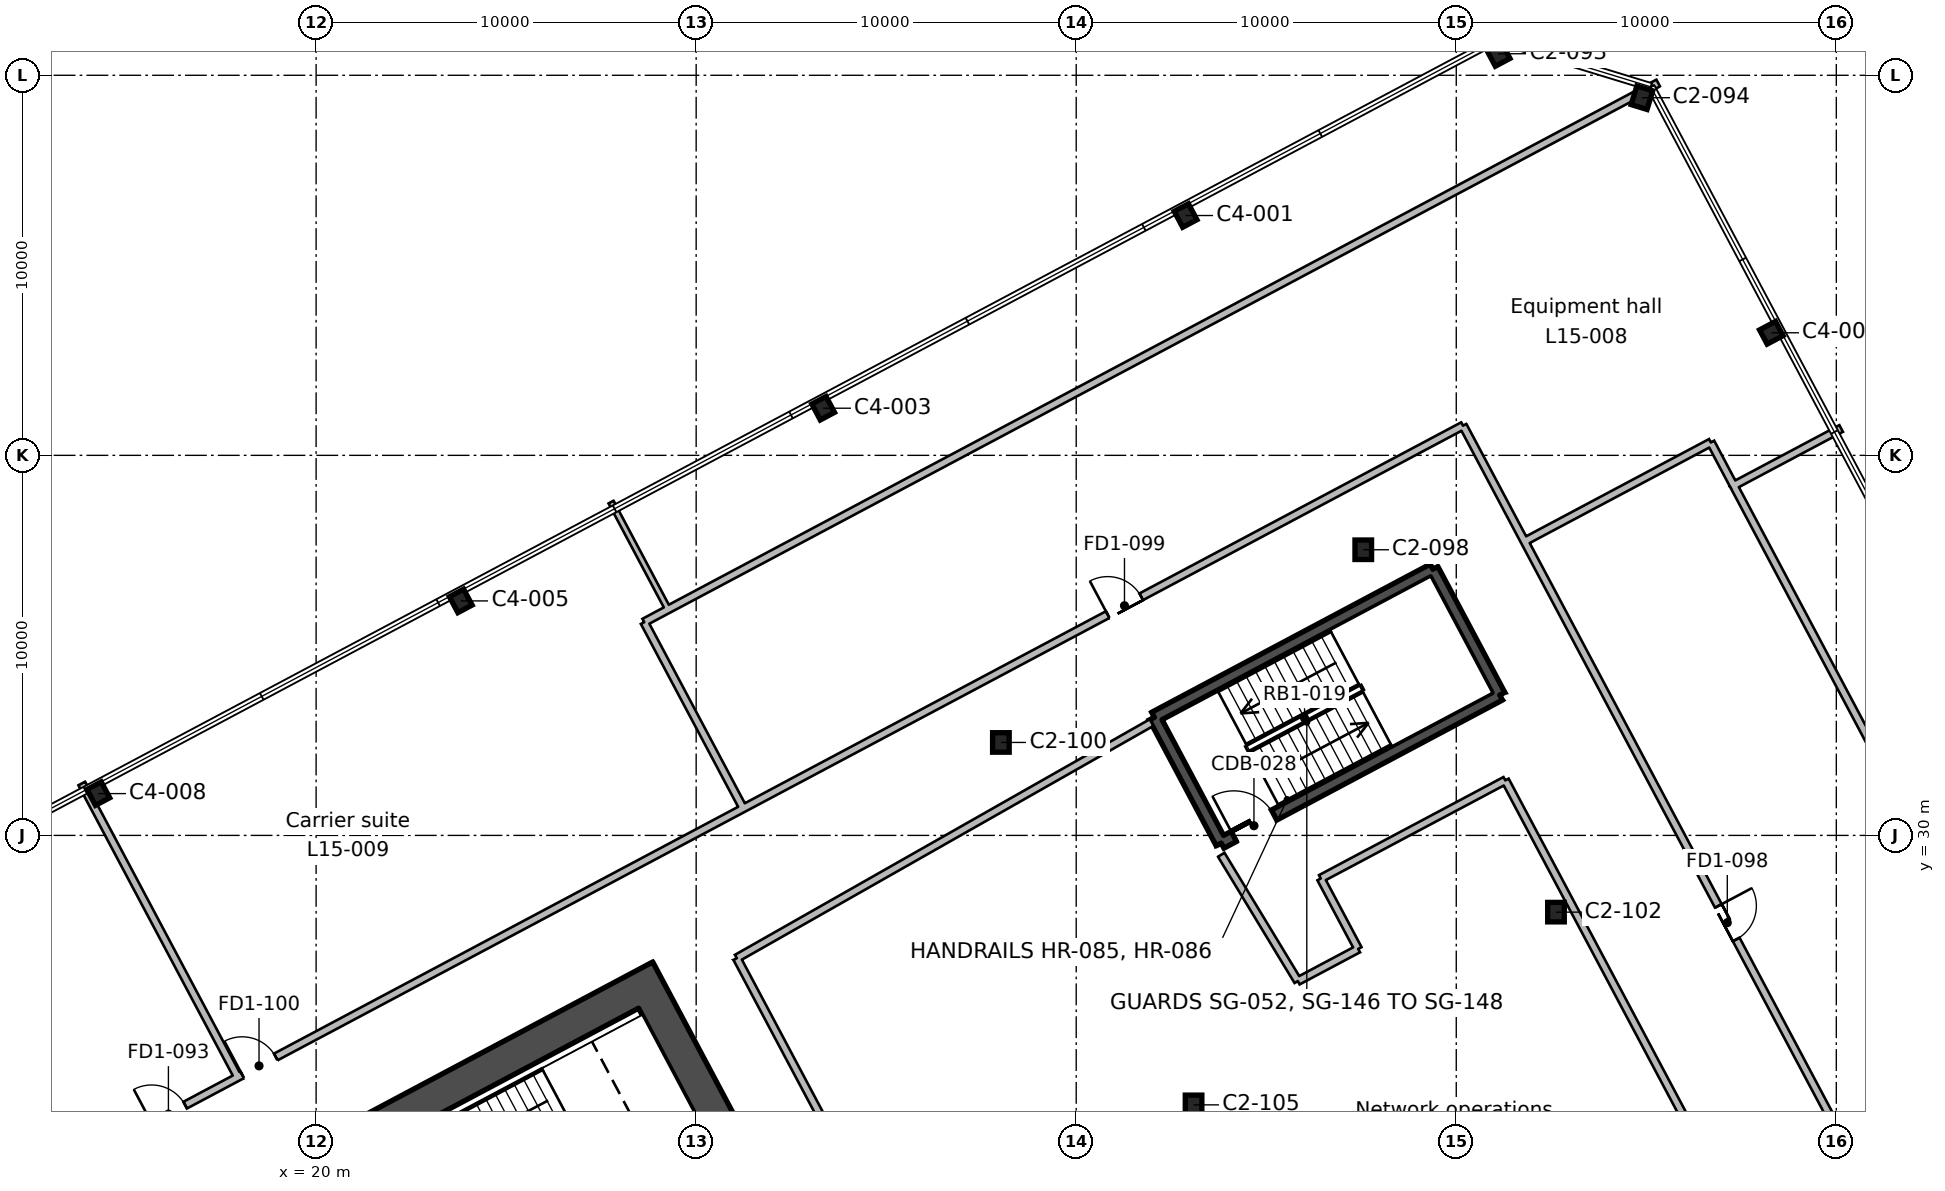
"""IFC4 building model, lengths in metres.
Left out: names, types, materials, properties, quantities, classifications, styles, units other than length and angle.
Written with IfcOpenShell. Run it as: python <this file> out.ifc"""

import sys

from ifc_helpers import new_model, si_unit, direction, frame, frame_2d, origin, origin_2d, place, context, subcontext, project, spatial, rectangle, i_section, extrude, element, fill, save


model = new_model("IFC4")
c1 = context("Model", 3, precision=1e-05, world=origin(), true_north=direction((0.0, 1.0)))
c2 = subcontext(c1, "Body", "Model", "MODEL_VIEW")
j1 = project(units=[si_unit("LENGTHUNIT", "METRE"), si_unit("PLANEANGLEUNIT", "RADIAN")], contexts=[c1])
p1 = place(None, origin())
s1 = spatial("IfcSite", under=j1, at=p1, CompositionType="ELEMENT")
p2 = place(p1, origin())
s2 = spatial("IfcBuilding", under=s1, at=p2, CompositionType="ELEMENT")
p3 = place(p2, frame((0.0, 0.0, 80.0)))
s3 = spatial("IfcBuildingStorey", under=s2, at=p3, CompositionType="ELEMENT", Elevation=80.0)
for number, where, z_axis, x_axis in (
    (1, (43.088, 22.91, 0.0), (0.0, 0.0, 1.0), (1.0, 0.0, 0.0)),
    (2, (52.624, 27.981, 0.0), (0.0, 0.0, 1.0), (1.0, 0.0, 0.0)),
):
    element("IfcColumn", number, at=place(p3, frame(where, z_axis=z_axis, x_axis=x_axis)), inside=s3, PredefinedType="COLUMN", context=c2, shape_type="SweptSolid", body=[
        extrude(i_section(OverallWidth=0.437, OverallDepth=0.513, WebThickness=0.061, FlangeThickness=0.097, FilletRadius=0.015, at=origin_2d()), origin(), (0.0, 0.0, 1.0), 4.6),
    ])
p4 = place(p3, frame((14.27, 31.1, 0.0), z_axis=(0.0, 0.0, 1.0), x_axis=(-0.882947592859, -0.469471562786, 0.0)))
e3 = element("IfcColumn", 3, at=p4, inside=s3, PredefinedType="COLUMN", context=c2, shape_type="SweptSolid", body=[
    extrude(i_section(OverallWidth=0.424, OverallDepth=0.475, WebThickness=0.048, FlangeThickness=0.077, FilletRadius=0.015, at=origin_2d()), origin(), (0.0, 0.0, 1.0), 4.6),
])
p5 = place(p3, frame((38.018, 32.446, 0.0), z_axis=(0.0, 0.0, 1.0), x_axis=(1.0, 0.0, 0.0)))
e4 = element("IfcColumn", 4, at=p5, inside=s3, PredefinedType="COLUMN", context=c2, shape_type="SweptSolid", body=[
    extrude(i_section(OverallWidth=0.437, OverallDepth=0.513, WebThickness=0.061, FlangeThickness=0.097, FilletRadius=0.015, at=origin_2d()), origin(), (0.0, 0.0, 1.0), 4.6),
])
p6 = place(p3, frame((23.806, 36.17, 0.0), z_axis=(0.0, 0.0, 1.0), x_axis=(-0.882947592859, -0.469471562786, 0.0)))
e5 = element("IfcColumn", 5, at=p6, inside=s3, PredefinedType="COLUMN", context=c2, shape_type="SweptSolid", body=[
    extrude(i_section(OverallWidth=0.424, OverallDepth=0.475, WebThickness=0.048, FlangeThickness=0.077, FilletRadius=0.015, at=origin_2d()), origin(), (0.0, 0.0, 1.0), 4.6),
])
p7 = place(p3, frame((47.553, 37.516, 0.0), z_axis=(0.0, 0.0, 1.0), x_axis=(1.0, 0.0, 0.0)))
e6 = element("IfcColumn", 6, at=p7, inside=s3, PredefinedType="COLUMN", context=c2, shape_type="SweptSolid", body=[
    extrude(i_section(OverallWidth=0.437, OverallDepth=0.513, WebThickness=0.061, FlangeThickness=0.097, FilletRadius=0.015, at=origin_2d()), origin(), (0.0, 0.0, 1.0), 4.6),
])
for number, where, z_axis, x_axis in (
    (7, (33.342, 41.24, 0.0), (0.0, 0.0, 1.0), (-0.883, -0.469, 0.0)),
    (8, (58.29, 43.225, 0.0), (0.0, 0.0, 1.0), (-0.469, 0.883, 0.0)),
    (9, (42.877, 46.31, 0.0), (0.0, 0.0, 1.0), (-0.883, -0.469, 0.0)),
):
    element("IfcColumn", number, at=place(p3, frame(where, z_axis=z_axis, x_axis=x_axis)), inside=s3, PredefinedType="COLUMN", context=c2, shape_type="SweptSolid", body=[
        extrude(i_section(OverallWidth=0.424, OverallDepth=0.475, WebThickness=0.048, FlangeThickness=0.077, FilletRadius=0.015, at=origin_2d()), origin(), (0.0, 0.0, 1.0), 4.6),
    ])
for number, where, z_axis, x_axis in (
    (10, (54.886, 49.41, 0.0), (0.0, 0.0, 1.0), (-0.956, 0.292, 0.0)),
    (11, (51.1, 50.567, 0.0), (0.0, 0.0, 1.0), (-0.883, -0.469, 0.0)),
):
    element("IfcColumn", number, at=place(p3, frame(where, z_axis=z_axis, x_axis=x_axis)), inside=s3, PredefinedType="COLUMN", context=c2, shape_type="SweptSolid", body=[
        extrude(i_section(OverallWidth=0.437, OverallDepth=0.513, WebThickness=0.061, FlangeThickness=0.097, FilletRadius=0.015, at=origin_2d()), origin(), (0.0, 0.0, 1.0), 4.6),
    ])
p8 = place(p3, frame((37.849, 8.799, 0.0), z_axis=(0.0, 0.0, 1.0), x_axis=(-0.469465789982, 0.882950662289, 0.0)))
e12 = element("IfcWall", 12, at=p8, inside=s3, PredefinedType="SHEAR", context=c2, shape_type="SweptSolid", body=[
    extrude(rectangle(XDim=20.0, YDim=0.9, at=frame_2d((10.0, 0.0))), origin(), (0.0, 0.0, 1.0), 4.6),
])
p9 = place(p8, frame((10.6, 0.0, 0.0)))
e13 = element("IfcOpeningElement", 13, at=p9, cuts=e12, PredefinedType="OPENING", context=c2, shape_type="SweptSolid", body=[
    extrude(rectangle(XDim=2.4, YDim=2.4, at=frame_2d((1.2, 1.2))), frame((0.0, 0.46, 0.0), z_axis=(0.0, -1.0, 0.0), x_axis=(1.0, 0.0, 0.0)), (0.0, 0.0, 1.0), 0.92),
])
p10 = place(p3, frame((10.438, 16.366, 0.0), z_axis=(0.0, 0.0, 1.0), x_axis=(0.88294509198, 0.469476266226, 0.0)))
e14 = element("IfcWall", 14, at=p10, inside=s3, PredefinedType="SHEAR", context=c2, shape_type="SweptSolid", body=[
    extrude(rectangle(XDim=20.2, YDim=0.9, at=frame_2d((10.1, 0.0))), origin(), (0.0, 0.0, 1.0), 4.6),
])
p11 = place(p3, frame((49.384, 37.004, 0.0), z_axis=(0.0, 0.0, 1.0), x_axis=(0.46946936446, -0.882948761726, 0.0)))
e15 = element("IfcWall", 15, at=p11, inside=s3, PredefinedType="SHEAR", context=c2, shape_type="SweptSolid", body=[
    extrude(rectangle(XDim=3.75, YDim=0.3, at=frame_2d((1.875, 0.0))), origin(), (0.0, 0.0, 1.0), 4.6),
])
p12 = place(p3, frame((51.145, 33.693, 0.0), z_axis=(0.0, 0.0, 1.0), x_axis=(-0.882945809314, -0.469474917132, 0.0)))
e16 = element("IfcWall", 16, at=p12, inside=s3, PredefinedType="SHEAR", context=c2, shape_type="SweptSolid", body=[
    extrude(rectangle(XDim=8.3, YDim=0.3, at=frame_2d((4.15, 0.0))), origin(), (0.0, 0.0, 1.0), 4.6),
])
p13 = place(p12, frame((6.725, 0.0, 0.0)))
e17 = element("IfcOpeningElement", 17, at=p13, cuts=e16, PredefinedType="OPENING", context=c2, shape_type="SweptSolid", body=[
    extrude(rectangle(XDim=1.2, YDim=2.1, at=frame_2d((0.6, 1.05))), frame((0.0, 0.16, 0.0), z_axis=(0.0, -1.0, 0.0), x_axis=(1.0, 0.0, 0.0)), (0.0, 0.0, 1.0), 0.32),
])
p14 = place(p3, frame((43.816, 29.796, 0.0), z_axis=(0.0, 0.0, 1.0), x_axis=(-0.46946936446, 0.882948761726, 0.0)))
e18 = element("IfcWall", 18, at=p14, inside=s3, PredefinedType="SHEAR", context=c2, shape_type="SweptSolid", body=[
    extrude(rectangle(XDim=3.75, YDim=0.3, at=frame_2d((1.875, 0.0))), origin(), (0.0, 0.0, 1.0), 4.6),
])
p15 = place(p3, frame((42.055, 33.107, 0.0), z_axis=(0.0, 0.0, 1.0), x_axis=(0.882945809314, 0.469474917132, 0.0)))
e19 = element("IfcWall", 19, at=p15, inside=s3, PredefinedType="SHEAR", context=c2, shape_type="SweptSolid", body=[
    extrude(rectangle(XDim=8.3, YDim=0.3, at=frame_2d((4.15, 0.0))), origin(), (0.0, 0.0, 1.0), 4.6),
])
p16 = place(p3, frame((0.0, 14.1, 0.0), z_axis=(0.0, 0.0, 1.0), x_axis=(0.882942713919, 0.469480738623, 0.0)))
e20 = element("IfcWall", 20, at=p16, inside=s3, PredefinedType="PARTITIONING", context=c2, shape_type="SweptSolid", body=[
    extrude(rectangle(XDim=36.591, YDim=0.2, at=frame_2d((18.296, 0.0))), origin(), (0.0, 0.0, 1.0), 4.2),
])
p17 = place(p16, frame((20.45, 0.0, 0.0)))
e21 = element("IfcOpeningElement", 21, at=p17, cuts=e20, PredefinedType="OPENING", context=c2, shape_type="SweptSolid", body=[
    extrude(rectangle(XDim=1.0, YDim=2.1, at=frame_2d((0.5, 1.05))), frame((0.0, 0.11, 0.0), z_axis=(0.0, -1.0, 0.0), x_axis=(1.0, 0.0, 0.0)), (0.0, 0.0, 1.0), 0.22),
])
p18 = place(p16, frame((17.75, 0.0, 0.0)))
e22 = element("IfcOpeningElement", 22, at=p18, cuts=e20, PredefinedType="OPENING", context=c2, shape_type="SweptSolid", body=[
    extrude(rectangle(XDim=1.0, YDim=2.1, at=frame_2d((0.5, 1.05))), frame((0.0, 0.11, 0.0), z_axis=(0.0, -1.0, 0.0), x_axis=(1.0, 0.0, 0.0)), (0.0, 0.0, 1.0), 0.22),
])
p19 = place(p3, frame((13.834, 31.366, 0.0), z_axis=(0.0, 0.0, 1.0), x_axis=(0.469374180568, -0.882999365014, 0.0)))
e23 = element("IfcWall", 23, at=p19, inside=s3, PredefinedType="PARTITIONING", context=c2, shape_type="SweptSolid", body=[
    extrude(rectangle(XDim=8.75, YDim=0.2, at=frame_2d((4.375, 0.0))), origin(), (0.0, 0.0, 1.0), 4.2),
])
p20 = place(p3, frame((30.235, 32.599, 0.0), z_axis=(0.0, 0.0, 1.0), x_axis=(0.46945013559, -0.882958985568, 0.0)))
e24 = element("IfcWall", 24, at=p20, inside=s3, PredefinedType="PARTITIONING", context=c2, shape_type="SweptSolid", body=[
    extrude(rectangle(XDim=2.138, YDim=0.2, at=frame_2d((1.069, 0.0))), origin(), (0.0, 0.0, 1.0), 4.2),
])
p21 = place(p3, frame((27.76, 38.771, 0.0), z_axis=(0.0, 0.0, 1.0), x_axis=(0.469320691295, -0.883027796121, 0.0)))
e25 = element("IfcWall", 25, at=p21, inside=s3, PredefinedType="PARTITIONING", context=c2, shape_type="SweptSolid", body=[
    extrude(rectangle(XDim=3.2, YDim=0.15, at=frame_2d((1.6, 0.0))), origin(), (0.0, 0.0, 1.0), 4.2),
])
p22 = place(p3, frame((29.26, 35.945, 0.0), z_axis=(0.0, 0.0, 1.0), x_axis=(0.882955510648, 0.469456671288, 0.0)))
e26 = element("IfcWall", 26, at=p22, inside=s3, PredefinedType="PARTITIONING", context=c2, shape_type="SweptSolid", body=[
    extrude(rectangle(XDim=29.507, YDim=0.2, at=frame_2d((14.753, 0.0))), origin(), (0.0, 0.0, 1.0), 4.2),
])
p23 = place(p3, frame((30.235, 32.599, 0.0), z_axis=(0.0, 0.0, 1.0), x_axis=(-0.469599917758, 0.882879333341, 0.0)))
e27 = element("IfcWall", 27, at=p23, inside=s3, PredefinedType="PARTITIONING", context=c2, shape_type="SweptSolid", body=[
    extrude(rectangle(XDim=3.412, YDim=0.2, at=frame_2d((1.706, 0.0))), origin(), (0.0, 0.0, 1.0), 4.2),
])
p24 = place(p3, frame((28.633, 35.611, 0.0), z_axis=(0.0, 0.0, 1.0), x_axis=(0.882581167339, 0.470160061106, 0.0)))
e28 = element("IfcWall", 28, at=p24, inside=s3, PredefinedType="PARTITIONING", context=c2, shape_type="SweptSolid", body=[
    extrude(rectangle(XDim=0.71, YDim=0.2, at=frame_2d((0.355, 0.0))), origin(), (0.0, 0.0, 1.0), 4.2),
])
p25 = place(p3, frame((32.308, 31.279, 0.0), z_axis=(0.0, 0.0, 1.0), x_axis=(0.882939951573, 0.469485933673, 0.0)))
e29 = element("IfcWall", 29, at=p25, inside=s3, PredefinedType="PARTITIONING", context=c2, shape_type="SweptSolid", body=[
    extrude(rectangle(XDim=20.239, YDim=0.2, at=frame_2d((10.12, 0.0))), origin(), (0.0, 0.0, 1.0), 4.2),
])
p26 = place(p25, frame((9.65, 0.0, 0.0)))
e30 = element("IfcOpeningElement", 30, at=p26, cuts=e29, PredefinedType="OPENING", context=c2, shape_type="SweptSolid", body=[
    extrude(rectangle(XDim=1.0, YDim=2.1, at=frame_2d((0.5, 1.05))), frame((0.0, 0.11, 0.0), z_axis=(0.0, -1.0, 0.0), x_axis=(1.0, 0.0, 0.0)), (0.0, 0.0, 1.0), 0.22),
])
p27 = place(p3, frame((50.178, 40.781, 0.0), z_axis=(0.0, 0.0, 1.0), x_axis=(0.469355564401, -0.883009260521, 0.0)))
e31 = element("IfcWall", 31, at=p27, inside=s3, PredefinedType="PARTITIONING", context=c2, shape_type="SweptSolid", body=[
    extrude(rectangle(XDim=3.445, YDim=0.2, at=frame_2d((1.723, 0.0))), origin(), (0.0, 0.0, 1.0), 4.2),
])
p28 = place(p3, frame((39.567, 10.788, 0.0), z_axis=(0.0, 0.0, 1.0), x_axis=(-0.469474056812, 0.882946266757, 0.0)))
e32 = element("IfcWall", 32, at=p28, inside=s3, PredefinedType="PARTITIONING", context=c2, shape_type="SweptSolid", body=[
    extrude(rectangle(XDim=18.101, YDim=0.2, at=frame_2d((9.05, 0.0))), origin(), (0.0, 0.0, 1.0), 4.2),
])
p29 = place(p28, frame((8.55, 0.0, 0.0)))
e33 = element("IfcOpeningElement", 33, at=p29, cuts=e32, PredefinedType="OPENING", context=c2, shape_type="SweptSolid", body=[
    extrude(rectangle(XDim=1.0, YDim=2.1, at=frame_2d((0.5, 1.05))), frame((0.0, 0.11, 0.0), z_axis=(0.0, -1.0, 0.0), x_axis=(1.0, 0.0, 0.0)), (0.0, 0.0, 1.0), 0.22),
])
p30 = place(p3, frame((31.069, 26.77, 0.0), z_axis=(0.0, 0.0, 1.0), x_axis=(0.86954617394, 0.493851649168, 0.0)))
e34 = element("IfcWall", 34, at=p30, inside=s3, PredefinedType="PARTITIONING", context=c2, shape_type="SweptSolid", body=[
    extrude(rectangle(XDim=12.55, YDim=0.2, at=frame_2d((6.275, 0.0))), origin(), (0.0, 0.0, 1.0), 4.2),
])
p31 = place(p3, frame((43.816, 29.491, 0.0), z_axis=(0.0, 0.0, 1.0), x_axis=(0.518473208291, -0.855093873376, 0.0)))
e35 = element("IfcWall", 35, at=p31, inside=s3, PredefinedType="PARTITIONING", context=c2, shape_type="SweptSolid", body=[
    extrude(rectangle(XDim=1.325, YDim=0.2, at=frame_2d((0.663, 0.0))), origin(), (0.0, 0.0, 1.0), 4.2),
])
p32 = place(p3, frame((45.831, 26.167, 0.0), z_axis=(0.0, 0.0, 1.0), x_axis=(-0.518386189645, 0.855146629757, 0.0)))
e36 = element("IfcWall", 36, at=p32, inside=s3, PredefinedType="PARTITIONING", context=c2, shape_type="SweptSolid", body=[
    extrude(rectangle(XDim=2.562, YDim=0.2, at=frame_2d((1.281, 0.0))), origin(), (0.0, 0.0, 1.0), 4.2),
])
p33 = place(p3, frame((47.42, 27.012, 0.0), z_axis=(0.0, 0.0, 1.0), x_axis=(-0.882911879422, -0.469538723829, 0.0)))
e37 = element("IfcWall", 37, at=p33, inside=s3, PredefinedType="PARTITIONING", context=c2, shape_type="SweptSolid", body=[
    extrude(rectangle(XDim=1.8, YDim=0.2, at=frame_2d((0.9, 0.0))), origin(), (0.0, 0.0, 1.0), 4.2),
])
p34 = place(p3, frame((46.434, 28.866, 0.0), z_axis=(0.0, 0.0, 1.0), x_axis=(0.882942083458, 0.469481924316, 0.0)))
e38 = element("IfcWall", 38, at=p34, inside=s3, PredefinedType="PARTITIONING", context=c2, shape_type="SweptSolid", body=[
    extrude(rectangle(XDim=5.5, YDim=0.2, at=frame_2d((2.75, 0.0))), origin(), (0.0, 0.0, 1.0), 4.2),
])
p35 = place(p3, frame((51.29, 31.448, 0.0), z_axis=(0.0, 0.0, 1.0), x_axis=(0.469459757109, -0.882953869947, 0.0)))
e39 = element("IfcWall", 39, at=p35, inside=s3, PredefinedType="PARTITIONING", context=c2, shape_type="SweptSolid", body=[
    extrude(rectangle(XDim=12.738, YDim=0.2, at=frame_2d((6.369, 0.0))), origin(), (0.0, 0.0, 1.0), 4.2),
])
p36 = place(p3, frame((47.42, 27.012, 0.0), z_axis=(0.0, 0.0, 1.0), x_axis=(-0.469489562011, 0.882938022266, 0.0)))
e40 = element("IfcWall", 40, at=p36, inside=s3, PredefinedType="PARTITIONING", context=c2, shape_type="SweptSolid", body=[
    extrude(rectangle(XDim=2.1, YDim=0.2, at=frame_2d((1.05, 0.0))), origin(), (0.0, 0.0, 1.0), 4.2),
])
p37 = place(p3, frame((51.795, 37.739, 0.0), z_axis=(0.0, 0.0, 1.0), x_axis=(0.469473160434, -0.882946743373, 0.0)))
e41 = element("IfcWall", 41, at=p37, inside=s3, PredefinedType="PARTITIONING", context=c2, shape_type="SweptSolid", body=[
    extrude(rectangle(XDim=1.216, YDim=0.2, at=frame_2d((0.608, 0.0))), origin(), (0.0, 0.0, 1.0), 4.2),
])
p38 = place(p3, frame((52.351, 38.029, 0.0), z_axis=(0.0, 0.0, 1.0), x_axis=(0.882969925021, 0.469429559688, 0.0)))
e42 = element("IfcWall", 42, at=p38, inside=s3, PredefinedType="PARTITIONING", context=c2, shape_type="SweptSolid", body=[
    extrude(rectangle(XDim=4.923, YDim=0.2, at=frame_2d((2.461, 0.0))), origin(), (0.0, 0.0, 1.0), 4.2),
])
p39 = place(p3, frame((56.698, 40.34, 0.0), z_axis=(0.0, 0.0, 1.0), x_axis=(0.468946315527, -0.883226671446, 0.0)))
e43 = element("IfcWall", 43, at=p39, inside=s3, PredefinedType="PARTITIONING", context=c2, shape_type="SweptSolid", body=[
    extrude(rectangle(XDim=1.282, YDim=0.2, at=frame_2d((0.641, 0.0))), origin(), (0.0, 0.0, 1.0), 4.2),
])
p40 = place(p3, frame((51.798, 37.734, 0.0), z_axis=(0.0, 0.0, 1.0), x_axis=(0.882191163795, 0.470891442396, 0.0)))
e44 = element("IfcWall", 44, at=p40, inside=s3, PredefinedType="PARTITIONING", context=c2, shape_type="SweptSolid", body=[
    extrude(rectangle(XDim=0.627, YDim=0.2, at=frame_2d((0.313, 0.0))), origin(), (0.0, 0.0, 1.0), 4.2),
])
p41 = place(p3, frame((52.366, 36.665, 0.0), z_axis=(0.0, 0.0, 1.0), x_axis=(0.469480933333, -0.882942610387, 0.0)))
e45 = element("IfcWall", 45, at=p41, inside=s3, PredefinedType="PARTITIONING", context=c2, shape_type="SweptSolid", body=[
    extrude(rectangle(XDim=20.239, YDim=0.2, at=frame_2d((10.12, 0.0))), origin(), (0.0, 0.0, 1.0), 4.2),
])
p42 = place(p41, frame((9.65, 0.0, 0.0)))
e46 = element("IfcOpeningElement", 46, at=p42, cuts=e45, PredefinedType="OPENING", context=c2, shape_type="SweptSolid", body=[
    extrude(rectangle(XDim=1.0, YDim=2.1, at=frame_2d((0.5, 1.05))), frame((0.0, 0.11, 0.0), z_axis=(0.0, -1.0, 0.0), x_axis=(1.0, 0.0, 0.0)), (0.0, 0.0, 1.0), 0.22),
])
p43 = place(p3, frame((57.299, 39.208, 0.0), z_axis=(0.0, 0.0, 1.0), x_axis=(0.469480728433, -0.882942719337, 0.0)))
e47 = element("IfcWall", 47, at=p43, inside=s3, PredefinedType="PARTITIONING", context=c2, shape_type="SweptSolid", body=[
    extrude(rectangle(XDim=28.934, YDim=0.2, at=frame_2d((14.467, 0.0))), origin(), (0.0, 0.0, 1.0), 4.2),
])
p44 = place(p3, frame((60.127, 40.707, 0.0), z_axis=(0.0, 0.0, 1.0), x_axis=(-0.883027796121, -0.469320691295, 0.0)))
e48 = element("IfcWall", 48, at=p44, inside=s3, PredefinedType="PARTITIONING", context=c2, shape_type="SweptSolid", body=[
    extrude(rectangle(XDim=3.2, YDim=0.2, at=frame_2d((1.6, 0.0))), origin(), (0.0, 0.0, 1.0), 4.2),
])
p45 = place(p13, frame((1.2, 0.0, 0.0), z_axis=(0.0, 0.0, 1.0), x_axis=(-1.0, 0.0, 0.0)))
e49 = element("IfcDoor", 49, at=p45, inside=s3, OperationType="SINGLE_SWING_LEFT", PredefinedType="DOOR", context=c2, shape_type="SweptSolid", body=[
    extrude(rectangle(XDim=1.2, YDim=2.1, at=frame_2d((0.6, 1.05))), frame((0.0, 0.025, 0.0), z_axis=(0.0, -1.0, 0.0), x_axis=(1.0, 0.0, 0.0)), (0.0, 0.0, 1.0), 0.05),
])
fill(e17, e49)
p46 = place(p42, origin())
e50 = element("IfcDoor", 50, at=p46, inside=s3, OperationType="SINGLE_SWING_LEFT", PredefinedType="DOOR", context=c2, shape_type="SweptSolid", body=[
    extrude(rectangle(XDim=1.0, YDim=2.1, at=frame_2d((0.5, 1.05))), frame((0.0, 0.025, 0.0), z_axis=(0.0, -1.0, 0.0), x_axis=(1.0, 0.0, 0.0)), (0.0, 0.0, 1.0), 0.05),
])
fill(e46, e50)
p47 = place(p26, origin())
e51 = element("IfcDoor", 51, at=p47, inside=s3, OperationType="SINGLE_SWING_LEFT", PredefinedType="DOOR", context=c2, shape_type="SweptSolid", body=[
    extrude(rectangle(XDim=1.0, YDim=2.1, at=frame_2d((0.5, 1.05))), frame((0.0, 0.025, 0.0), z_axis=(0.0, -1.0, 0.0), x_axis=(1.0, 0.0, 0.0)), (0.0, 0.0, 1.0), 0.05),
])
fill(e30, e51)
p48 = place(p17, origin())
e52 = element("IfcDoor", 52, at=p48, inside=s3, OperationType="SINGLE_SWING_LEFT", PredefinedType="DOOR", context=c2, shape_type="SweptSolid", body=[
    extrude(rectangle(XDim=1.0, YDim=2.1, at=frame_2d((0.5, 1.05))), frame((0.0, 0.025, 0.0), z_axis=(0.0, -1.0, 0.0), x_axis=(1.0, 0.0, 0.0)), (0.0, 0.0, 1.0), 0.05),
])
fill(e21, e52)
p49 = place(p18, origin())
e53 = element("IfcDoor", 53, at=p49, inside=s3, OperationType="SINGLE_SWING_LEFT", PredefinedType="DOOR", context=c2, shape_type="SweptSolid", body=[
    extrude(rectangle(XDim=1.0, YDim=2.1, at=frame_2d((0.5, 1.05))), frame((0.0, 0.025, 0.0), z_axis=(0.0, -1.0, 0.0), x_axis=(1.0, 0.0, 0.0)), (0.0, 0.0, 1.0), 0.05),
])
fill(e22, e53)
save(model, sys.argv[1])
